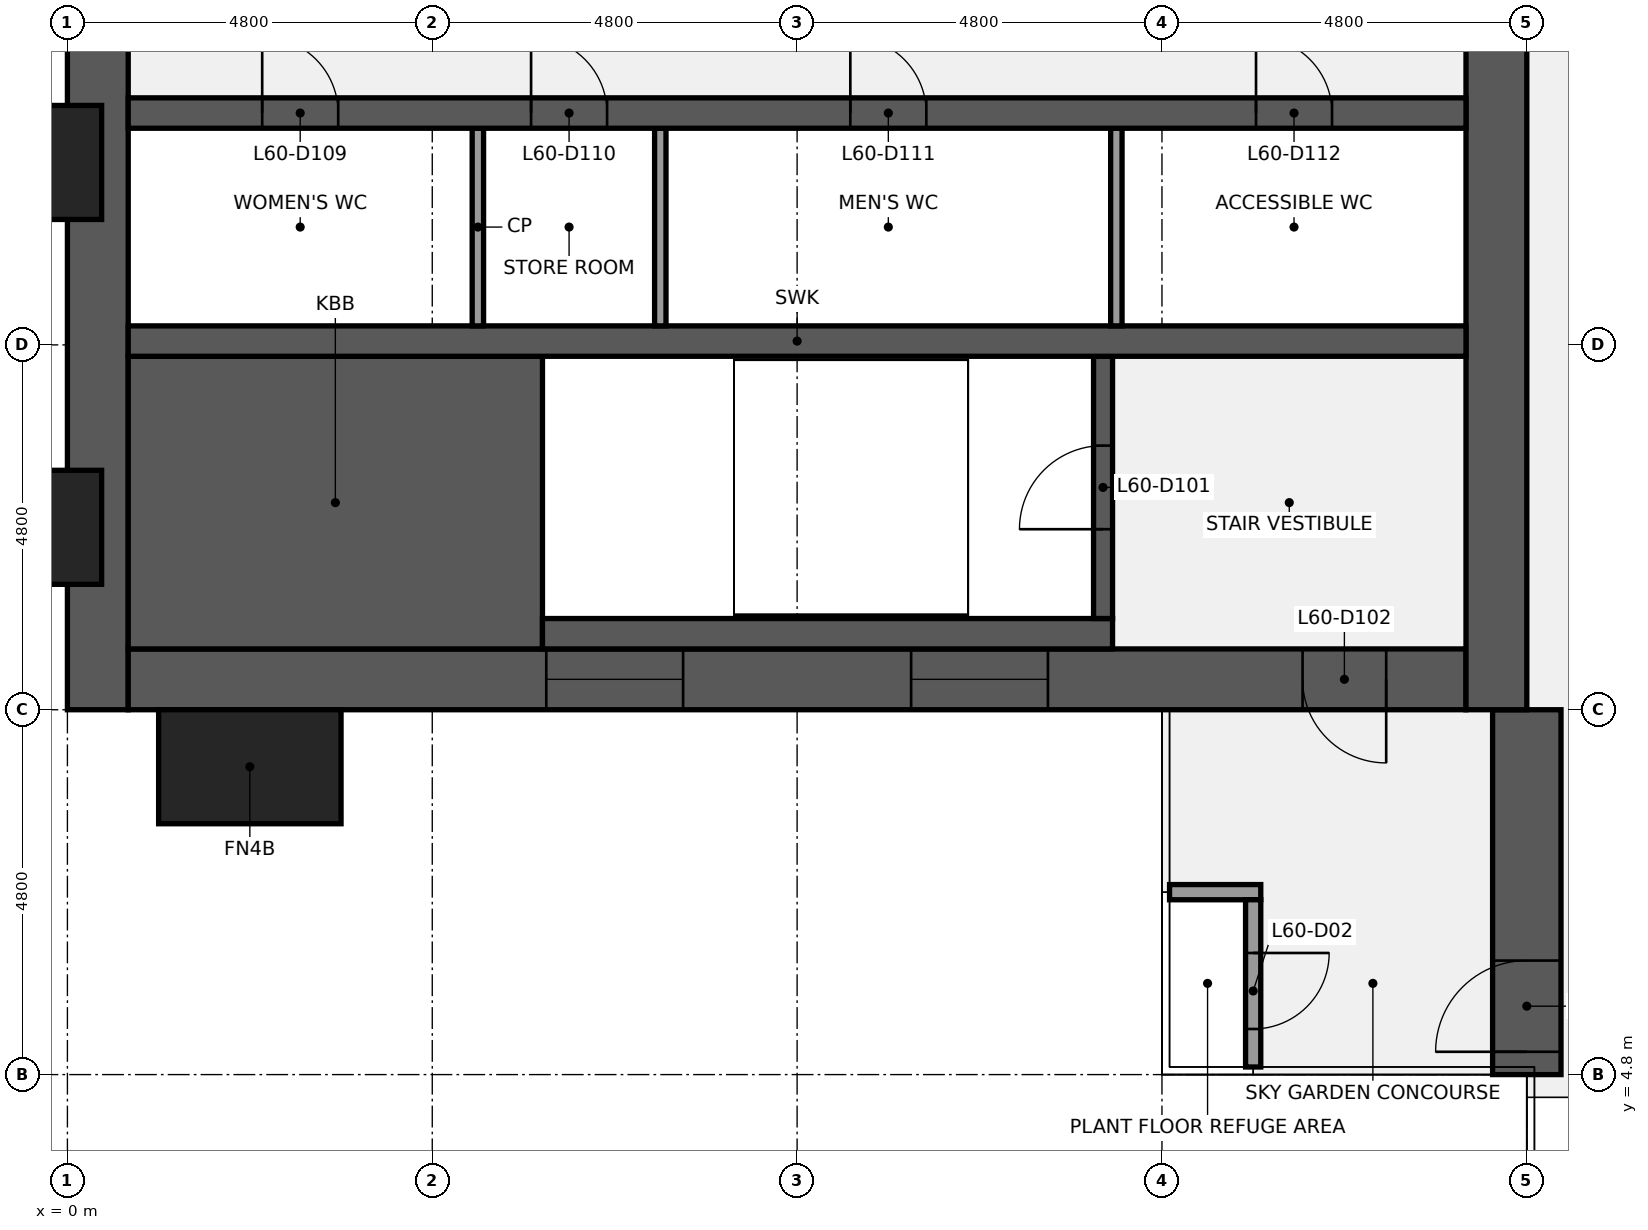
"""IFC4 building model, lengths in metres.
Left out: names, types, materials, properties, quantities, classifications, styles, units other than length and angle.
Written with IfcOpenShell. Run it as: python <this file> out.ifc"""

import sys

from ifc_helpers import new_model, si_unit, direction, frame, frame_2d, origin, origin_2d, place, context, subcontext, project, spatial, rectangle, extrude, element, fill, save


model = new_model("IFC4")
c1 = context("Model", 3, precision=1e-05, world=origin(), true_north=direction((0.0, 1.0)))
c2 = subcontext(c1, "Body", "Model", "MODEL_VIEW")
j1 = project(units=[si_unit("LENGTHUNIT", "METRE"), si_unit("PLANEANGLEUNIT", "RADIAN")], contexts=[c1])
p1 = place(None, origin())
s1 = spatial("IfcSite", under=j1, at=p1, CompositionType="ELEMENT")
p2 = place(p1, origin())
s2 = spatial("IfcBuilding", under=s1, at=p2, CompositionType="ELEMENT")
p3 = place(p2, frame((0.0, 0.0, 269.7)))
s3 = spatial("IfcBuildingStorey", under=s2, at=p3, CompositionType="ELEMENT", Elevation=269.7)
p4 = place(p3, frame((19.2, 4.8, 0.0), z_axis=(0.0, 0.0, 1.0), x_axis=(0.0, 1.0, 0.0)))
e1 = element("IfcWall", 1, at=p4, inside=s3, PredefinedType="SHEAR", context=c2, shape_type="SweptSolid", body=[
    extrude(rectangle(XDim=4.8, YDim=0.9, at=frame_2d((2.4, 0.0))), origin(), (0.0, 0.0, 1.0), 12.3),
])
p5 = place(p4, frame((0.3, 0.0, 0.0)))
e2 = element("IfcOpeningElement", 2, at=p5, cuts=e1, PredefinedType="OPENING", context=c2, shape_type="SweptSolid", body=[
    extrude(rectangle(XDim=1.2, YDim=2.1, at=frame_2d((0.6, 1.05))), frame((0.0, 0.46, 0.0), z_axis=(0.0, -1.0, 0.0), x_axis=(1.0, 0.0, 0.0)), (0.0, 0.0, 1.0), 0.92),
])
p6 = place(p3, frame((0.4, 9.6, 0.0), z_axis=(0.0, 0.0, 1.0), x_axis=(0.0, 1.0, 0.0)))
e3 = element("IfcWall", 3, at=p6, inside=s3, PredefinedType="SHEAR", context=c2, shape_type="SweptSolid", body=[
    extrude(rectangle(XDim=28.8, YDim=0.8, at=frame_2d((14.4, 0.0))), origin(), (0.0, 0.0, 1.0), 12.3),
])
p7 = place(p6, frame((8.85, 0.0, 0.9)))
e4 = element("IfcOpeningElement", 4, at=p7, cuts=e3, PredefinedType="OPENING", context=c2, shape_type="SweptSolid", body=[
    extrude(rectangle(XDim=1.5, YDim=6.3, at=frame_2d((0.75, 3.15))), frame((0.0, 0.41, 0.0), z_axis=(0.0, -1.0, 0.0), x_axis=(1.0, 0.0, 0.0)), (0.0, 0.0, 1.0), 0.82),
])
p8 = place(p6, frame((18.45, 0.0, 0.9)))
e5 = element("IfcOpeningElement", 5, at=p8, cuts=e3, PredefinedType="OPENING", context=c2, shape_type="SweptSolid", body=[
    extrude(rectangle(XDim=1.5, YDim=6.3, at=frame_2d((0.75, 3.15))), frame((0.0, 0.41, 0.0), z_axis=(0.0, -1.0, 0.0), x_axis=(1.0, 0.0, 0.0)), (0.0, 0.0, 1.0), 0.82),
])
p9 = place(p3, frame((18.4, 10.0, 0.0), z_axis=(0.0, 0.0, 1.0), x_axis=(-1.0, 0.0, 0.0)))
e6 = element("IfcWall", 6, at=p9, inside=s3, PredefinedType="SHEAR", context=c2, shape_type="SweptSolid", body=[
    extrude(rectangle(XDim=17.6, YDim=0.8, at=frame_2d((8.8, 0.0))), origin(), (0.0, 0.0, 1.0), 12.3),
])
p10 = place(p9, frame((1.05, 0.0, 0.0)))
e7 = element("IfcOpeningElement", 7, at=p10, cuts=e6, PredefinedType="OPENING", context=c2, shape_type="SweptSolid", body=[
    extrude(rectangle(XDim=1.1, YDim=2.1, at=frame_2d((0.55, 1.05))), frame((0.0, 0.41, 0.0), z_axis=(0.0, -1.0, 0.0), x_axis=(1.0, 0.0, 0.0)), (0.0, 0.0, 1.0), 0.82),
])
p11 = place(p9, frame((10.3, 0.0, 0.9)))
e8 = element("IfcOpeningElement", 8, at=p11, cuts=e6, PredefinedType="OPENING", context=c2, shape_type="SweptSolid", body=[
    extrude(rectangle(XDim=1.8, YDim=1.5, at=frame_2d((0.9, 0.75))), frame((0.0, 0.41, 0.0), z_axis=(0.0, -1.0, 0.0), x_axis=(1.0, 0.0, 0.0)), (0.0, 0.0, 1.0), 0.82),
])
p12 = place(p9, frame((5.5, 0.0, 0.9)))
e9 = element("IfcOpeningElement", 9, at=p12, cuts=e6, PredefinedType="OPENING", context=c2, shape_type="SweptSolid", body=[
    extrude(rectangle(XDim=1.8, YDim=1.5, at=frame_2d((0.9, 0.75))), frame((0.0, 0.41, 0.0), z_axis=(0.0, -1.0, 0.0), x_axis=(1.0, 0.0, 0.0)), (0.0, 0.0, 1.0), 0.82),
])
p13 = place(p3, frame((18.8, 38.4, 0.0), z_axis=(0.0, 0.0, 1.0), x_axis=(0.0, -1.0, 0.0)))
e10 = element("IfcWall", 10, at=p13, inside=s3, PredefinedType="SHEAR", context=c2, shape_type="SweptSolid", body=[
    extrude(rectangle(XDim=28.8, YDim=0.8, at=frame_2d((14.4, 0.0))), origin(), (0.0, 0.0, 1.0), 12.3),
])
p14 = place(p13, frame((18.3, 0.0, 0.0)))
e11 = element("IfcOpeningElement", 11, at=p14, cuts=e10, PredefinedType="OPENING", context=c2, shape_type="SweptSolid", body=[
    extrude(rectangle(XDim=1.8, YDim=2.1, at=frame_2d((0.9, 1.05))), frame((0.0, 0.41, 0.0), z_axis=(0.0, -1.0, 0.0), x_axis=(1.0, 0.0, 0.0)), (0.0, 0.0, 1.0), 0.82),
])
p15 = place(p13, frame((8.7, 0.0, 0.0)))
e12 = element("IfcOpeningElement", 12, at=p15, cuts=e10, PredefinedType="OPENING", context=c2, shape_type="SweptSolid", body=[
    extrude(rectangle(XDim=1.8, YDim=2.1, at=frame_2d((0.9, 1.05))), frame((0.0, 0.41, 0.0), z_axis=(0.0, -1.0, 0.0), x_axis=(1.0, 0.0, 0.0)), (0.0, 0.0, 1.0), 0.82),
])
p16 = place(p3, frame((0.8, 12.325, 0.0), z_axis=(0.0, 0.0, 1.0), x_axis=(1.0, 0.0, 0.0)))
e13 = element("IfcWall", 13, at=p16, inside=s3, PredefinedType="SHEAR", context=c2, shape_type="SweptSolid", body=[
    extrude(rectangle(XDim=5.45, YDim=3.85, at=frame_2d((2.725, 0.0))), origin(), (0.0, 0.0, 1.0), 12.3),
])
p17 = place(p3, frame((6.25, 10.6, 0.0), z_axis=(0.0, 0.0, 1.0), x_axis=(1.0, 0.0, 0.0)))
e14 = element("IfcWall", 14, at=p17, inside=s3, PredefinedType="SHEAR", context=c2, shape_type="SweptSolid", body=[
    extrude(rectangle(XDim=7.5, YDim=0.4, at=frame_2d((3.75, 0.0))), origin(), (0.0, 0.0, 1.0), 12.3),
])
p18 = place(p3, frame((13.625, 10.8, 0.0), z_axis=(0.0, 0.0, 1.0), x_axis=(0.0, 1.0, 0.0)))
e15 = element("IfcWall", 15, at=p18, inside=s3, PredefinedType="SHEAR", context=c2, shape_type="SweptSolid", body=[
    extrude(rectangle(XDim=3.45, YDim=0.25, at=frame_2d((1.725, 0.0))), origin(), (0.0, 0.0, 1.0), 12.3),
])
p19 = place(p18, frame((1.175, 0.0, 0.0)))
e16 = element("IfcOpeningElement", 16, at=p19, cuts=e15, PredefinedType="OPENING", context=c2, shape_type="SweptSolid", body=[
    extrude(rectangle(XDim=1.1, YDim=2.1, at=frame_2d((0.55, 1.05))), frame((0.0, 0.135, 0.0), z_axis=(0.0, -1.0, 0.0), x_axis=(1.0, 0.0, 0.0)), (0.0, 0.0, 1.0), 0.27),
])
p20 = place(p3, frame((0.8, 14.45, 0.0), z_axis=(0.0, 0.0, 1.0), x_axis=(1.0, 0.0, 0.0)))
e17 = element("IfcWall", 17, at=p20, inside=s3, PredefinedType="SHEAR", context=c2, shape_type="SweptSolid", body=[
    extrude(rectangle(XDim=17.6, YDim=0.4, at=frame_2d((8.8, 0.0))), origin(), (0.0, 0.0, 1.0), 12.3),
])
for number, where, z_axis, x_axis in (
    (18, (5.4, 14.65, 0.0), (0.0, 0.0, 1.0), (0.0, 1.0, 0.0)),
    (19, (7.8, 14.65, 0.0), (0.0, 0.0, 1.0), (0.0, 1.0, 0.0)),
    (20, (13.8, 14.65, 0.0), (0.0, 0.0, 1.0), (0.0, 1.0, 0.0)),
):
    element("IfcWall", number, at=place(p3, frame(where, z_axis=z_axis, x_axis=x_axis)), inside=s3, PredefinedType="PARTITIONING", context=c2, shape_type="SweptSolid", body=[
        extrude(rectangle(XDim=2.6, YDim=0.15, at=frame_2d((1.3, 0.0))), origin(), (0.0, 0.0, 1.0), 12.3),
    ])
p21 = place(p3, frame((0.8, 17.45, 0.0), z_axis=(0.0, 0.0, 1.0), x_axis=(1.0, 0.0, 0.0)))
e21 = element("IfcWall", 21, at=p21, inside=s3, PredefinedType="SHEAR", context=c2, shape_type="SweptSolid", body=[
    extrude(rectangle(XDim=17.6, YDim=0.4, at=frame_2d((8.8, 0.0))), origin(), (0.0, 0.0, 1.0), 12.3),
])
p22 = place(p21, frame((1.762, 0.0, 0.0)))
e22 = element("IfcOpeningElement", 22, at=p22, cuts=e21, PredefinedType="OPENING", context=c2, shape_type="SweptSolid", body=[
    extrude(rectangle(XDim=1.0, YDim=2.1, at=frame_2d((0.5, 1.05))), frame((0.0, 0.21, 0.0), z_axis=(0.0, -1.0, 0.0), x_axis=(1.0, 0.0, 0.0)), (0.0, 0.0, 1.0), 0.42),
])
p23 = place(p21, frame((5.3, 0.0, 0.0)))
e23 = element("IfcOpeningElement", 23, at=p23, cuts=e21, PredefinedType="OPENING", context=c2, shape_type="SweptSolid", body=[
    extrude(rectangle(XDim=1.0, YDim=2.1, at=frame_2d((0.5, 1.05))), frame((0.0, 0.21, 0.0), z_axis=(0.0, -1.0, 0.0), x_axis=(1.0, 0.0, 0.0)), (0.0, 0.0, 1.0), 0.42),
])
p24 = place(p21, frame((9.5, 0.0, 0.0)))
e24 = element("IfcOpeningElement", 24, at=p24, cuts=e21, PredefinedType="OPENING", context=c2, shape_type="SweptSolid", body=[
    extrude(rectangle(XDim=1.0, YDim=2.1, at=frame_2d((0.5, 1.05))), frame((0.0, 0.21, 0.0), z_axis=(0.0, -1.0, 0.0), x_axis=(1.0, 0.0, 0.0)), (0.0, 0.0, 1.0), 0.42),
])
p25 = place(p21, frame((14.837, 0.0, 0.0)))
e25 = element("IfcOpeningElement", 25, at=p25, cuts=e21, PredefinedType="OPENING", context=c2, shape_type="SweptSolid", body=[
    extrude(rectangle(XDim=1.0, YDim=2.1, at=frame_2d((0.5, 1.05))), frame((0.0, 0.21, 0.0), z_axis=(0.0, -1.0, 0.0), x_axis=(1.0, 0.0, 0.0)), (0.0, 0.0, 1.0), 0.42),
])
p26 = place(p3, frame((14.5, 7.2, 0.0), z_axis=(0.0, 0.0, 1.0), x_axis=(1.0, 0.0, 0.0)))
e26 = element("IfcWall", 26, at=p26, inside=s3, PredefinedType="PARTITIONING", context=c2, shape_type="SweptSolid", body=[
    extrude(rectangle(XDim=1.2, YDim=0.2, at=frame_2d((0.6, 0.0))), origin(), (0.0, 0.0, 1.0), 11.31),
])
p27 = place(p3, frame((15.6, 4.9, 0.0), z_axis=(0.0, 0.0, 1.0), x_axis=(0.0, 1.0, 0.0)))
e27 = element("IfcWall", 27, at=p27, inside=s3, PredefinedType="PARTITIONING", context=c2, shape_type="SweptSolid", body=[
    extrude(rectangle(XDim=2.2, YDim=0.2, at=frame_2d((1.1, 0.0))), origin(), (0.0, 0.0, 1.0), 11.31),
])
p28 = place(p27, frame((0.5, 0.0, 0.0)))
e28 = element("IfcOpeningElement", 28, at=p28, cuts=e27, PredefinedType="OPENING", context=c2, shape_type="SweptSolid", body=[
    extrude(rectangle(XDim=1.0, YDim=2.1, at=frame_2d((0.5, 1.05))), frame((0.0, 0.11, 0.0), z_axis=(0.0, -1.0, 0.0), x_axis=(1.0, 0.0, 0.0)), (0.0, 0.0, 1.0), 0.22),
])
for number, where, z_axis, x_axis in (
    (29, (-0.75, 12.0, 0.0), (0.0, 0.0, 1.0), (0.0, 1.0, 0.0)),
    (30, (-0.75, 16.8, 0.0), (0.0, 0.0, 1.0), (0.0, 1.0, 0.0)),
    (31, (2.4, 8.85, 0.0), (0.0, 0.0, 1.0), (1.0, 0.0, 0.0)),
):
    element("IfcColumn", number, at=place(p3, frame(where, z_axis=z_axis, x_axis=x_axis)), inside=s3, PredefinedType="PILASTER", context=c2, shape_type="SweptSolid", body=[
        extrude(rectangle(XDim=2.4, YDim=1.5, at=origin_2d()), origin(), (0.0, 0.0, 1.0), 12.6),
    ])
p29 = place(p19, origin())
e32 = element("IfcDoor", 32, at=p29, inside=s3, OperationType="SINGLE_SWING_LEFT", PredefinedType="DOOR", context=c2, shape_type="SweptSolid", body=[
    extrude(rectangle(XDim=1.1, YDim=2.1, at=frame_2d((0.55, 1.05))), frame((0.0, 0.025, 0.0), z_axis=(0.0, -1.0, 0.0), x_axis=(1.0, 0.0, 0.0)), (0.0, 0.0, 1.0), 0.05),
])
fill(e16, e32)
p30 = place(p10, origin())
e33 = element("IfcDoor", 33, at=p30, inside=s3, OperationType="SINGLE_SWING_LEFT", PredefinedType="DOOR", context=c2, shape_type="SweptSolid", body=[
    extrude(rectangle(XDim=1.1, YDim=2.1, at=frame_2d((0.55, 1.05))), frame((0.0, 0.025, 0.0), z_axis=(0.0, -1.0, 0.0), x_axis=(1.0, 0.0, 0.0)), (0.0, 0.0, 1.0), 0.05),
])
fill(e7, e33)
p31 = place(p22, origin())
e34 = element("IfcDoor", 34, at=p31, inside=s3, OperationType="SINGLE_SWING_LEFT", PredefinedType="DOOR", context=c2, shape_type="SweptSolid", body=[
    extrude(rectangle(XDim=1.0, YDim=2.1, at=frame_2d((0.5, 1.05))), frame((0.0, 0.025, 0.0), z_axis=(0.0, -1.0, 0.0), x_axis=(1.0, 0.0, 0.0)), (0.0, 0.0, 1.0), 0.05),
])
fill(e22, e34)
p32 = place(p23, origin())
e35 = element("IfcDoor", 35, at=p32, inside=s3, OperationType="SINGLE_SWING_LEFT", PredefinedType="DOOR", context=c2, shape_type="SweptSolid", body=[
    extrude(rectangle(XDim=1.0, YDim=2.1, at=frame_2d((0.5, 1.05))), frame((0.0, 0.025, 0.0), z_axis=(0.0, -1.0, 0.0), x_axis=(1.0, 0.0, 0.0)), (0.0, 0.0, 1.0), 0.05),
])
fill(e23, e35)
p33 = place(p24, origin())
e36 = element("IfcDoor", 36, at=p33, inside=s3, OperationType="SINGLE_SWING_LEFT", PredefinedType="DOOR", context=c2, shape_type="SweptSolid", body=[
    extrude(rectangle(XDim=1.0, YDim=2.1, at=frame_2d((0.5, 1.05))), frame((0.0, 0.025, 0.0), z_axis=(0.0, -1.0, 0.0), x_axis=(1.0, 0.0, 0.0)), (0.0, 0.0, 1.0), 0.05),
])
fill(e24, e36)
p34 = place(p25, origin())
e37 = element("IfcDoor", 37, at=p34, inside=s3, OperationType="SINGLE_SWING_LEFT", PredefinedType="DOOR", context=c2, shape_type="SweptSolid", body=[
    extrude(rectangle(XDim=1.0, YDim=2.1, at=frame_2d((0.5, 1.05))), frame((0.0, 0.025, 0.0), z_axis=(0.0, -1.0, 0.0), x_axis=(1.0, 0.0, 0.0)), (0.0, 0.0, 1.0), 0.05),
])
fill(e25, e37)
p35 = place(p11, origin())
e38 = element("IfcWindow", 38, at=p35, inside=s3, PartitioningType="SINGLE_PANEL", PredefinedType="WINDOW", context=c2, shape_type="SweptSolid", body=[
    extrude(rectangle(XDim=1.8, YDim=1.5, at=frame_2d((0.9, 0.75))), frame((0.0, 0.03, 0.0), z_axis=(0.0, -1.0, 0.0), x_axis=(1.0, 0.0, 0.0)), (0.0, 0.0, 1.0), 0.06),
])
fill(e8, e38)
p36 = place(p12, origin())
e39 = element("IfcWindow", 39, at=p36, inside=s3, PartitioningType="SINGLE_PANEL", PredefinedType="WINDOW", context=c2, shape_type="SweptSolid", body=[
    extrude(rectangle(XDim=1.8, YDim=1.5, at=frame_2d((0.9, 0.75))), frame((0.0, 0.03, 0.0), z_axis=(0.0, -1.0, 0.0), x_axis=(1.0, 0.0, 0.0)), (0.0, 0.0, 1.0), 0.06),
])
fill(e9, e39)
p37 = place(p28, origin())
e40 = element("IfcDoor", 40, at=p37, inside=s3, OperationType="SINGLE_SWING_RIGHT", PredefinedType="DOOR", context=c2, shape_type="SweptSolid", body=[
    extrude(rectangle(XDim=1.0, YDim=2.1, at=frame_2d((0.5, 1.05))), frame((0.0, 0.025, 0.0), z_axis=(0.0, -1.0, 0.0), x_axis=(1.0, 0.0, 0.0)), (0.0, 0.0, 1.0), 0.05),
])
fill(e28, e40)
p38 = place(p5, origin())
e41 = element("IfcDoor", 41, at=p38, inside=s3, OperationType="SINGLE_SWING_LEFT", PredefinedType="DOOR", context=c2, shape_type="SweptSolid", body=[
    extrude(rectangle(XDim=1.2, YDim=2.1, at=frame_2d((0.6, 1.05))), frame((0.0, 0.025, 0.0), z_axis=(0.0, -1.0, 0.0), x_axis=(1.0, 0.0, 0.0)), (0.0, 0.0, 1.0), 0.05),
])
fill(e2, e41)
save(model, sys.argv[1])
